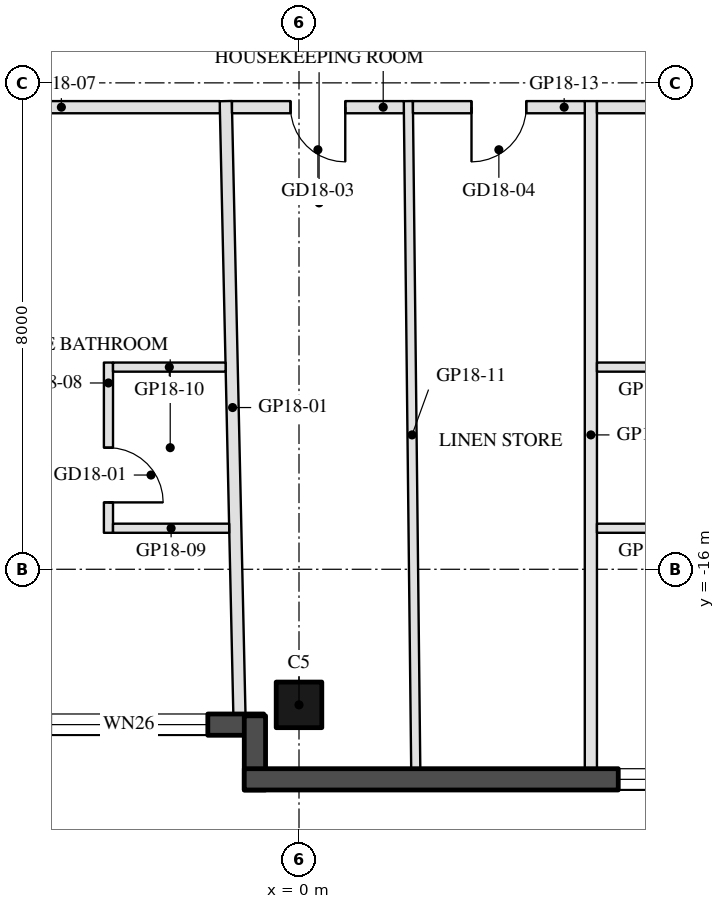
"""IFC4 building model, lengths in metres.
Left out: names, types, materials, properties, quantities, classifications, styles, units other than length and angle.
Written with IfcOpenShell. Run it as: python <this file> out.ifc"""

import sys

from ifc_helpers import new_model, si_unit, direction, frame, frame_2d, origin, origin_2d, place, context, subcontext, project, spatial, rectangle, hollow_rectangle, extrude, element, fill, save


model = new_model("IFC4")
c1 = context("Model", 3, precision=1e-05, world=origin(), true_north=direction((0.0, 1.0)))
c2 = subcontext(c1, "Body", "Model", "MODEL_VIEW")
j1 = project(units=[si_unit("LENGTHUNIT", "METRE"), si_unit("PLANEANGLEUNIT", "RADIAN")], contexts=[c1])
p1 = place(None, origin())
s1 = spatial("IfcSite", under=j1, at=p1, CompositionType="ELEMENT")
p2 = place(p1, origin())
s2 = spatial("IfcBuilding", under=s1, at=p2, CompositionType="ELEMENT")
p3 = place(p2, frame((0.0, 0.0, 191.0)))
s3 = spatial("IfcBuildingStorey", under=s2, at=p3, CompositionType="ELEMENT", Elevation=191.0)
p4 = place(p3, frame((0.0, -18.23, 0.0), z_axis=(0.0, 0.0, 1.0), x_axis=(-1.0, 0.0, 0.0)))
e1 = element("IfcColumn", 1, at=p4, inside=s3, PredefinedType="COLUMN", context=c2, shape_type="SweptSolid", body=[
    extrude(hollow_rectangle(XDim=0.75, YDim=0.75, WallThickness=0.035, at=origin_2d()), origin(), (0.0, 0.0, 1.0), 3.7),
])
p5 = place(p3, frame((-7.32, -18.555, 0.0), z_axis=(0.0, 0.0, 1.0), x_axis=(1.0, 0.0, 0.0)))
e2 = element("IfcWall", 2, at=p5, inside=s3, PredefinedType="SOLIDWALL", context=c2, shape_type="SweptSolid", body=[
    extrude(rectangle(XDim=6.74, YDim=0.35, at=frame_2d((3.37, 0.0))), origin(), (0.0, 0.0, 1.0), 3.55),
])
p6 = place(p5, frame((0.32, 0.0, 0.3)))
e3 = element("IfcOpeningElement", 3, at=p6, cuts=e2, PredefinedType="OPENING", context=c2, shape_type="SweptSolid", body=[
    extrude(rectangle(XDim=2.6, YDim=2.65, at=frame_2d((1.3, 1.325))), frame((0.0, 0.185, 0.0), z_axis=(0.0, -1.0, 0.0), x_axis=(1.0, 0.0, 0.0)), (0.0, 0.0, 1.0), 0.37),
])
p7 = place(p5, frame((3.22, 0.0, 0.3)))
e4 = element("IfcOpeningElement", 4, at=p7, cuts=e2, PredefinedType="OPENING", context=c2, shape_type="SweptSolid", body=[
    extrude(rectangle(XDim=2.6, YDim=2.65, at=frame_2d((1.3, 1.325))), frame((0.0, 0.185, 0.0), z_axis=(0.0, -1.0, 0.0), x_axis=(1.0, 0.0, 0.0)), (0.0, 0.0, 1.0), 0.37),
])
p8 = place(p3, frame((-0.725, -18.41, 0.0), z_axis=(0.0, 0.0, 1.0), x_axis=(0.0, -1.0, 0.0)))
e5 = element("IfcWall", 5, at=p8, inside=s3, PredefinedType="SOLIDWALL", context=c2, shape_type="SweptSolid", body=[
    extrude(rectangle(XDim=1.22, YDim=0.35, at=frame_2d((0.61, 0.0))), origin(), (0.0, 0.0, 1.0), 3.55),
])
p9 = place(p3, frame((-0.9, -19.455, 0.0), z_axis=(0.0, 0.0, 1.0), x_axis=(1.0, 0.0, 0.0)))
e6 = element("IfcWall", 6, at=p9, inside=s3, PredefinedType="SOLIDWALL", context=c2, shape_type="SweptSolid", body=[
    extrude(rectangle(XDim=9.7, YDim=0.35, at=frame_2d((4.85, 0.0))), origin(), (0.0, 0.0, 1.0), 3.55),
])
p10 = place(p9, frame((6.15, 0.0, 0.3)))
e7 = element("IfcOpeningElement", 7, at=p10, cuts=e6, PredefinedType="OPENING", context=c2, shape_type="SweptSolid", body=[
    extrude(rectangle(XDim=1.9, YDim=2.65, at=frame_2d((0.95, 1.325))), frame((0.0, 0.185, 0.0), z_axis=(0.0, -1.0, 0.0), x_axis=(1.0, 0.0, 0.0)), (0.0, 0.0, 1.0), 0.37),
])
p11 = place(p3, frame((-0.98, -18.38, 0.0), z_axis=(0.0, 0.0, 1.0), x_axis=(-0.022277513004, 0.999751825412, 0.0)))
e8 = element("IfcWall", 8, at=p11, inside=s3, PredefinedType="PARTITIONING", context=c2, shape_type="SweptSolid", body=[
    extrude(rectangle(XDim=10.082, YDim=0.2, at=frame_2d((5.041, 0.0))), origin(), (0.0, 0.0, 1.0), 3.06),
])
p12 = place(p3, frame((4.8, -19.28, 0.0), z_axis=(0.0, 0.0, 1.0), x_axis=(0.0, 1.0, 0.0)))
e9 = element("IfcWall", 9, at=p12, inside=s3, PredefinedType="PARTITIONING", context=c2, shape_type="SweptSolid", body=[
    extrude(rectangle(XDim=10.98, YDim=0.2, at=frame_2d((5.49, 0.0))), origin(), (0.0, 0.0, 1.0), 3.06),
])
p13 = place(p3, frame((-1.302, -8.4, 0.0), z_axis=(0.0, 0.0, 1.0), x_axis=(-1.0, 0.0, 0.0)))
e10 = element("IfcWall", 10, at=p13, inside=s3, PredefinedType="PARTITIONING", context=c2, shape_type="SweptSolid", body=[
    extrude(rectangle(XDim=8.686, YDim=0.2, at=frame_2d((4.343, 0.0))), origin(), (0.0, 0.0, 1.0), 2.95),
])
p14 = place(p13, frame((3.843, 0.0, 0.0)))
e11 = element("IfcOpeningElement", 11, at=p14, cuts=e10, PredefinedType="OPENING", context=c2, shape_type="SweptSolid", body=[
    extrude(rectangle(XDim=1.0, YDim=2.1, at=frame_2d((0.5, 1.05))), frame((0.0, 0.11, 0.0), z_axis=(0.0, -1.0, 0.0), x_axis=(1.0, 0.0, 0.0)), (0.0, 0.0, 1.0), 0.22),
])
p15 = place(p3, frame((-3.134, -12.6, 0.0), z_axis=(0.0, 0.0, 1.0), x_axis=(0.0, -1.0, 0.0)))
e12 = element("IfcWall", 12, at=p15, inside=s3, PredefinedType="PARTITIONING", context=c2, shape_type="SweptSolid", body=[
    extrude(rectangle(XDim=2.8, YDim=0.15, at=frame_2d((1.4, 0.0))), origin(), (0.0, 0.0, 1.0), 3.55),
])
p16 = place(p15, frame((1.4, 0.0, 0.0)))
e13 = element("IfcOpeningElement", 13, at=p16, cuts=e12, PredefinedType="OPENING", context=c2, shape_type="SweptSolid", body=[
    extrude(rectangle(XDim=0.9, YDim=2.1, at=frame_2d((0.45, 1.05))), frame((0.0, 0.085, 0.0), z_axis=(0.0, -1.0, 0.0), x_axis=(1.0, 0.0, 0.0)), (0.0, 0.0, 1.0), 0.17),
])
p17 = place(p3, frame((-3.059, -15.325, 0.0), z_axis=(0.0, 0.0, 1.0), x_axis=(1.0, 0.0, 0.0)))
e14 = element("IfcWall", 14, at=p17, inside=s3, PredefinedType="PARTITIONING", context=c2, shape_type="SweptSolid", body=[
    extrude(rectangle(XDim=1.91, YDim=0.15, at=frame_2d((0.955, 0.0))), origin(), (0.0, 0.0, 1.0), 3.55),
])
p18 = place(p3, frame((-3.059, -12.675, 0.0), z_axis=(0.0, 0.0, 1.0), x_axis=(1.0, 0.0, 0.0)))
e15 = element("IfcWall", 15, at=p18, inside=s3, PredefinedType="PARTITIONING", context=c2, shape_type="SweptSolid", body=[
    extrude(rectangle(XDim=1.852, YDim=0.15, at=frame_2d((0.926, 0.0))), origin(), (0.0, 0.0, 1.0), 3.55),
])
p19 = place(p3, frame((1.92, -19.28, 0.0), z_axis=(0.0, 0.0, 1.0), x_axis=(-0.011116847578, 0.999938205941, 0.0)))
e16 = element("IfcWall", 16, at=p19, inside=s3, PredefinedType="PARTITIONING", context=c2, shape_type="SweptSolid", body=[
    extrude(rectangle(XDim=10.981, YDim=0.15, at=frame_2d((5.49, 0.0))), origin(), (0.0, 0.0, 1.0), 3.06),
])
p20 = place(p3, frame((1.724, -8.4, 0.0), z_axis=(0.0, 0.0, 1.0), x_axis=(-1.0, 0.0, 0.0)))
e17 = element("IfcWall", 17, at=p20, inside=s3, PredefinedType="PARTITIONING", context=c2, shape_type="SweptSolid", body=[
    extrude(rectangle(XDim=2.826, YDim=0.2, at=frame_2d((1.413, 0.0))), origin(), (0.0, 0.0, 1.0), 2.95),
])
p21 = place(p20, frame((0.963, 0.0, 0.0)))
e18 = element("IfcOpeningElement", 18, at=p21, cuts=e17, PredefinedType="OPENING", context=c2, shape_type="SweptSolid", body=[
    extrude(rectangle(XDim=0.9, YDim=2.1, at=frame_2d((0.45, 1.05))), frame((0.0, 0.11, 0.0), z_axis=(0.0, -1.0, 0.0), x_axis=(1.0, 0.0, 0.0)), (0.0, 0.0, 1.0), 0.22),
])
p22 = place(p3, frame((4.7, -8.4, 0.0), z_axis=(0.0, 0.0, 1.0), x_axis=(-1.0, 0.0, 0.0)))
e19 = element("IfcWall", 19, at=p22, inside=s3, PredefinedType="PARTITIONING", context=c2, shape_type="SweptSolid", body=[
    extrude(rectangle(XDim=2.826, YDim=0.2, at=frame_2d((1.413, 0.0))), origin(), (0.0, 0.0, 1.0), 2.95),
])
p23 = place(p22, frame((0.963, 0.0, 0.0)))
e20 = element("IfcOpeningElement", 20, at=p23, cuts=e19, PredefinedType="OPENING", context=c2, shape_type="SweptSolid", body=[
    extrude(rectangle(XDim=0.9, YDim=2.1, at=frame_2d((0.45, 1.05))), frame((0.0, 0.11, 0.0), z_axis=(0.0, -1.0, 0.0), x_axis=(1.0, 0.0, 0.0)), (0.0, 0.0, 1.0), 0.22),
])
p24 = place(p3, frame((9.988, -8.4, 0.0), z_axis=(0.0, 0.0, 1.0), x_axis=(-1.0, 0.0, 0.0)))
e21 = element("IfcWall", 21, at=p24, inside=s3, PredefinedType="PARTITIONING", context=c2, shape_type="SweptSolid", body=[
    extrude(rectangle(XDim=5.088, YDim=0.2, at=frame_2d((2.544, 0.0))), origin(), (0.0, 0.0, 1.0), 2.95),
])
p25 = place(p24, frame((2.044, 0.0, 0.0)))
e22 = element("IfcOpeningElement", 22, at=p25, cuts=e21, PredefinedType="OPENING", context=c2, shape_type="SweptSolid", body=[
    extrude(rectangle(XDim=1.0, YDim=2.1, at=frame_2d((0.5, 1.05))), frame((0.0, 0.11, 0.0), z_axis=(0.0, -1.0, 0.0), x_axis=(1.0, 0.0, 0.0)), (0.0, 0.0, 1.0), 0.22),
])
for number, where, z_axis, x_axis in (
    (23, (4.9, -15.325, 0.0), (0.0, 0.0, 1.0), (1.0, 0.0, 0.0)),
    (24, (4.9, -12.675, 0.0), (0.0, 0.0, 1.0), (1.0, 0.0, 0.0)),
):
    element("IfcWall", number, at=place(p3, frame(where, z_axis=z_axis, x_axis=x_axis)), inside=s3, PredefinedType="PARTITIONING", context=c2, shape_type="SweptSolid", body=[
        extrude(rectangle(XDim=1.85, YDim=0.15, at=frame_2d((0.925, 0.0))), origin(), (0.0, 0.0, 1.0), 3.55),
    ])
p26 = place(p7, origin())
e25 = element("IfcWindow", 25, at=p26, inside=s3, PartitioningType="SINGLE_PANEL", PredefinedType="WINDOW", context=c2, shape_type="SweptSolid", body=[
    extrude(rectangle(XDim=2.6, YDim=2.65, at=frame_2d((1.3, 1.325))), frame((0.0, 0.03, 0.0), z_axis=(0.0, -1.0, 0.0), x_axis=(1.0, 0.0, 0.0)), (0.0, 0.0, 1.0), 0.06),
])
fill(e4, e25)
p27 = place(p10, origin())
e26 = element("IfcWindow", 26, at=p27, inside=s3, PartitioningType="SINGLE_PANEL", PredefinedType="WINDOW", context=c2, shape_type="SweptSolid", body=[
    extrude(rectangle(XDim=1.9, YDim=2.65, at=frame_2d((0.95, 1.325))), frame((0.0, 0.03, 0.0), z_axis=(0.0, -1.0, 0.0), x_axis=(1.0, 0.0, 0.0)), (0.0, 0.0, 1.0), 0.06),
])
fill(e7, e26)
p28 = place(p16, origin())
e27 = element("IfcDoor", 27, at=p28, inside=s3, OperationType="SINGLE_SWING_RIGHT", PredefinedType="DOOR", context=c2, shape_type="SweptSolid", body=[
    extrude(rectangle(XDim=0.9, YDim=2.1, at=frame_2d((0.45, 1.05))), frame((0.0, 0.025, 0.0), z_axis=(0.0, -1.0, 0.0), x_axis=(1.0, 0.0, 0.0)), (0.0, 0.0, 1.0), 0.05),
])
fill(e13, e27)
p29 = place(p21, origin())
e28 = element("IfcDoor", 28, at=p29, inside=s3, OperationType="SINGLE_SWING_LEFT", PredefinedType="DOOR", context=c2, shape_type="SweptSolid", body=[
    extrude(rectangle(XDim=0.9, YDim=2.1, at=frame_2d((0.45, 1.05))), frame((0.0, 0.025, 0.0), z_axis=(0.0, -1.0, 0.0), x_axis=(1.0, 0.0, 0.0)), (0.0, 0.0, 1.0), 0.05),
])
fill(e18, e28)
p30 = place(p23, origin())
e29 = element("IfcDoor", 29, at=p30, inside=s3, OperationType="SINGLE_SWING_RIGHT", PredefinedType="DOOR", context=c2, shape_type="SweptSolid", body=[
    extrude(rectangle(XDim=0.9, YDim=2.1, at=frame_2d((0.45, 1.05))), frame((0.0, 0.025, 0.0), z_axis=(0.0, -1.0, 0.0), x_axis=(1.0, 0.0, 0.0)), (0.0, 0.0, 1.0), 0.05),
])
fill(e20, e29)
save(model, sys.argv[1])
